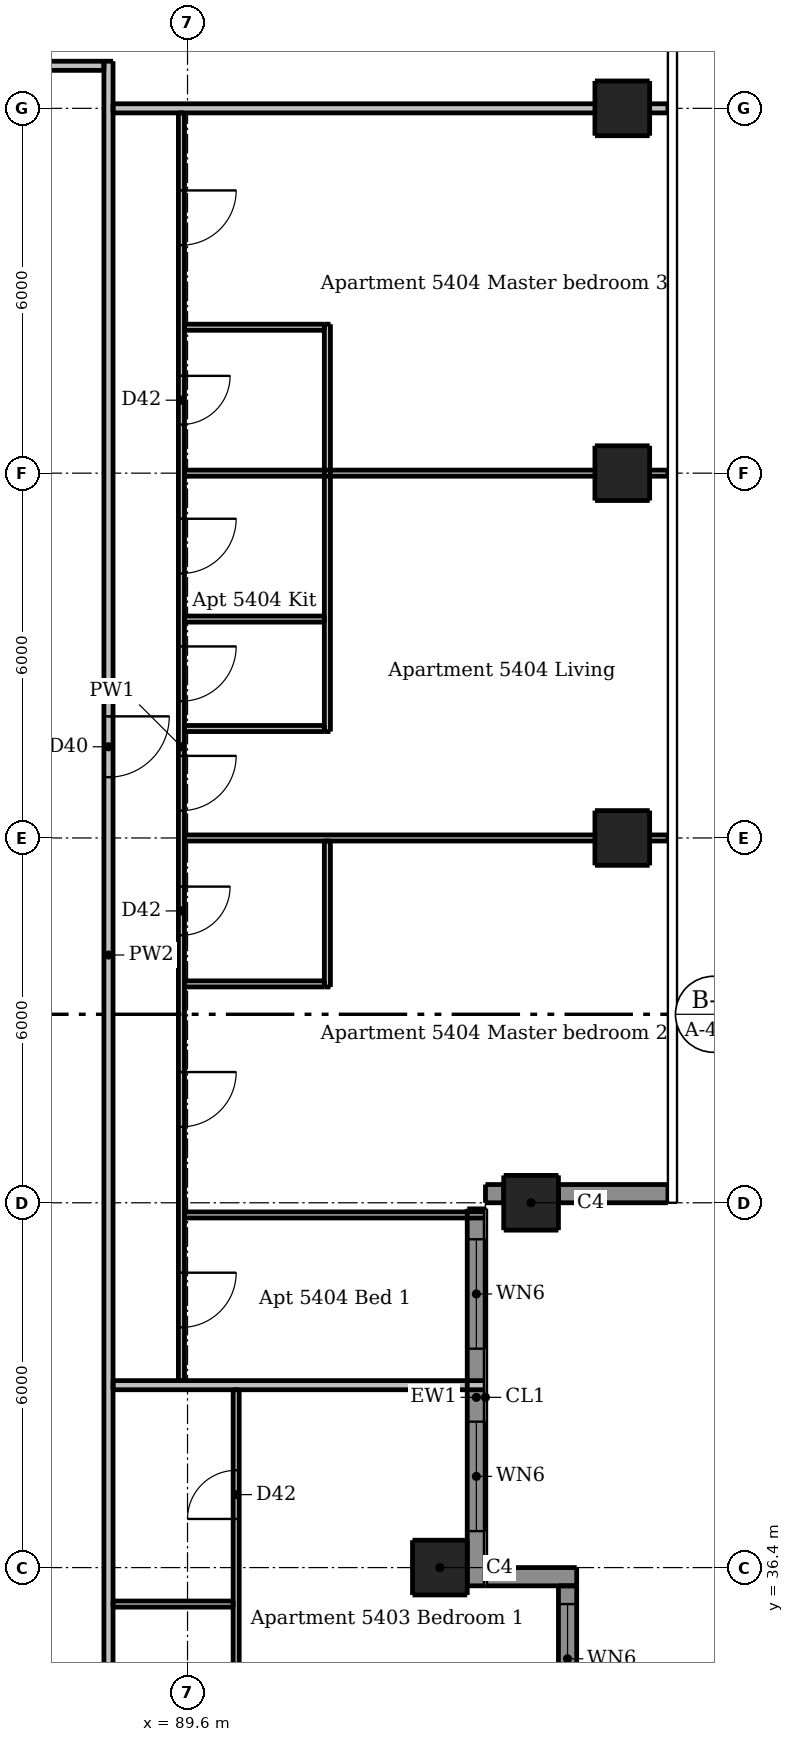
"""IFC4 building model, lengths in metres.
Left out: names, types, materials, properties, quantities, classifications, styles, units other than length and angle.
Written with IfcOpenShell. Run it as: python <this file> out.ifc"""

import sys

from ifc_helpers import new_model, si_unit, direction, frame, frame_2d, origin, origin_2d, place, context, subcontext, project, spatial, rectangle, extrude, element, fill, save


model = new_model("IFC4")
c1 = context("Model", 3, precision=1e-05, world=origin(), true_north=direction((0.0, 1.0)))
c2 = subcontext(c1, "Body", "Model", "MODEL_VIEW")
j1 = project(units=[si_unit("LENGTHUNIT", "METRE"), si_unit("PLANEANGLEUNIT", "RADIAN")], contexts=[c1])
p1 = place(None, origin())
s1 = spatial("IfcSite", under=j1, at=p1, CompositionType="ELEMENT")
p2 = place(p1, origin())
s2 = spatial("IfcBuilding", under=s1, at=p2, CompositionType="ELEMENT")
p3 = place(p2, frame((0.0, 0.0, 203.5)))
s3 = spatial("IfcBuildingStorey", under=s2, at=p3, CompositionType="ELEMENT", Elevation=203.5)
for number, where, z_axis, x_axis in (
    (1, (93.75, 36.4, 0.0), (0.0, 0.0, 1.0), (1.0, 0.0, 0.0)),
    (2, (95.25, 42.4, 0.0), (0.0, 0.0, 1.0), (1.0, 0.0, 0.0)),
    (3, (96.75, 48.4, 0.0), (0.0, 0.0, 1.0), (1.0, 0.0, 0.0)),
    (4, (96.75, 54.4, 0.0), (0.0, 0.0, 1.0), (1.0, 0.0, 0.0)),
    (5, (96.75, 60.4, 0.0), (0.0, 0.0, 1.0), (1.0, 0.0, 0.0)),
):
    element("IfcColumn", number, at=place(p3, frame(where, z_axis=z_axis, x_axis=x_axis)), inside=s3, PredefinedType="COLUMN", context=c2, shape_type="SweptSolid", body=[
        extrude(rectangle(XDim=0.9, YDim=0.9, at=origin_2d()), origin(), (0.0, 0.0, 1.0), 3.05),
    ])
p4 = place(p3, frame((96.0, 36.25, 0.0), z_axis=(0.0, 0.0, 1.0), x_axis=(-1.0, 0.0, 0.0)))
e6 = element("IfcWall", 6, at=p4, inside=s3, PredefinedType="SOLIDWALL", context=c2, shape_type="SweptSolid", body=[
    extrude(rectangle(XDim=1.5, YDim=0.3, at=frame_2d((0.75, 0.0))), origin(), (0.0, 0.0, 1.0), 3.05),
])
p5 = place(p3, frame((94.5, 42.55, 0.0), z_axis=(0.0, 0.0, 1.0), x_axis=(1.0, 0.0, 0.0)))
e7 = element("IfcWall", 7, at=p5, inside=s3, PredefinedType="SOLIDWALL", context=c2, shape_type="SweptSolid", body=[
    extrude(rectangle(XDim=0.3, YDim=0.3, at=frame_2d((0.15, 0.0))), origin(), (0.0, 0.0, 1.0), 3.05),
])
p6 = place(p3, frame((95.7, 42.55, 0.0), z_axis=(0.0, 0.0, 1.0), x_axis=(1.0, 0.0, 0.0)))
e8 = element("IfcWall", 8, at=p6, inside=s3, PredefinedType="SOLIDWALL", context=c2, shape_type="SweptSolid", body=[
    extrude(rectangle(XDim=1.8, YDim=0.3, at=frame_2d((0.9, 0.0))), origin(), (0.0, 0.0, 1.0), 3.05),
])
p7 = place(p3, frame((95.85, 30.1, 0.0), z_axis=(0.0, 0.0, 1.0), x_axis=(0.0, 1.0, 0.0)))
e9 = element("IfcWall", 9, at=p7, inside=s3, PredefinedType="SOLIDWALL", context=c2, shape_type="SweptSolid", body=[
    extrude(rectangle(XDim=6.0, YDim=0.3, at=frame_2d((3.0, 0.0))), origin(), (0.0, 0.0, 1.0), 3.05),
])
p8 = place(p7, frame((0.9, 0.0, 0.15)))
e10 = element("IfcOpeningElement", 10, at=p8, cuts=e9, PredefinedType="OPENING", context=c2, shape_type="SweptSolid", body=[
    extrude(rectangle(XDim=1.8, YDim=2.1, at=frame_2d((0.9, 1.05))), frame((0.0, 0.16, 0.0), z_axis=(0.0, -1.0, 0.0), x_axis=(1.0, 0.0, 0.0)), (0.0, 0.0, 1.0), 0.32),
])
p9 = place(p7, frame((3.9, 0.0, 0.15)))
e11 = element("IfcOpeningElement", 11, at=p9, cuts=e9, PredefinedType="OPENING", context=c2, shape_type="SweptSolid", body=[
    extrude(rectangle(XDim=1.8, YDim=2.1, at=frame_2d((0.9, 1.05))), frame((0.0, 0.16, 0.0), z_axis=(0.0, -1.0, 0.0), x_axis=(1.0, 0.0, 0.0)), (0.0, 0.0, 1.0), 0.32),
])
p10 = place(p3, frame((94.35, 36.1, 0.0), z_axis=(0.0, 0.0, 1.0), x_axis=(0.0, 1.0, 0.0)))
e12 = element("IfcWall", 12, at=p10, inside=s3, PredefinedType="SOLIDWALL", context=c2, shape_type="SweptSolid", body=[
    extrude(rectangle(XDim=6.2, YDim=0.3, at=frame_2d((3.1, 0.0))), origin(), (0.0, 0.0, 1.0), 3.05),
])
p11 = place(p10, frame((0.9, 0.0, 0.15)))
e13 = element("IfcOpeningElement", 13, at=p11, cuts=e12, PredefinedType="OPENING", context=c2, shape_type="SweptSolid", body=[
    extrude(rectangle(XDim=1.8, YDim=2.1, at=frame_2d((0.9, 1.05))), frame((0.0, 0.16, 0.0), z_axis=(0.0, -1.0, 0.0), x_axis=(1.0, 0.0, 0.0)), (0.0, 0.0, 1.0), 0.32),
])
p12 = place(p10, frame((3.9, 0.0, 0.15)))
e14 = element("IfcOpeningElement", 14, at=p12, cuts=e12, PredefinedType="OPENING", context=c2, shape_type="SweptSolid", body=[
    extrude(rectangle(XDim=1.8, YDim=2.1, at=frame_2d((0.9, 1.05))), frame((0.0, 0.16, 0.0), z_axis=(0.0, -1.0, 0.0), x_axis=(1.0, 0.0, 0.0)), (0.0, 0.0, 1.0), 0.32),
])
p13 = place(p3, frame((89.5, 60.325, 0.0), z_axis=(0.0, 0.0, 1.0), x_axis=(0.0, -1.0, 0.0)))
e15 = element("IfcWall", 15, at=p13, inside=s3, PredefinedType="PARTITIONING", context=c2, shape_type="SweptSolid", body=[
    extrude(rectangle(XDim=20.85, YDim=0.1, at=frame_2d((10.425, 0.0))), origin(), (0.0, 0.0, 1.0), 2.51),
])
p14 = place(p13, frame((10.575, 0.0, 0.0)))
e16 = element("IfcOpeningElement", 16, at=p14, cuts=e15, PredefinedType="OPENING", context=c2, shape_type="SweptSolid", body=[
    extrude(rectangle(XDim=0.9, YDim=2.1, at=frame_2d((0.45, 1.05))), frame((0.0, 0.06, 0.0), z_axis=(0.0, -1.0, 0.0), x_axis=(1.0, 0.0, 0.0)), (0.0, 0.0, 1.0), 0.12),
])
p15 = place(p13, frame((6.675, 0.0, 0.0)))
e17 = element("IfcOpeningElement", 17, at=p15, cuts=e15, PredefinedType="OPENING", context=c2, shape_type="SweptSolid", body=[
    extrude(rectangle(XDim=0.9, YDim=2.1, at=frame_2d((0.45, 1.05))), frame((0.0, 0.06, 0.0), z_axis=(0.0, -1.0, 0.0), x_axis=(1.0, 0.0, 0.0)), (0.0, 0.0, 1.0), 0.12),
])
p16 = place(p13, frame((8.775, 0.0, 0.0)))
e18 = element("IfcOpeningElement", 18, at=p16, cuts=e15, PredefinedType="OPENING", context=c2, shape_type="SweptSolid", body=[
    extrude(rectangle(XDim=0.9, YDim=2.1, at=frame_2d((0.45, 1.05))), frame((0.0, 0.06, 0.0), z_axis=(0.0, -1.0, 0.0), x_axis=(1.0, 0.0, 0.0)), (0.0, 0.0, 1.0), 0.12),
])
p17 = place(p13, frame((19.075, 0.0, 0.0)))
e19 = element("IfcOpeningElement", 19, at=p17, cuts=e15, PredefinedType="OPENING", context=c2, shape_type="SweptSolid", body=[
    extrude(rectangle(XDim=0.9, YDim=2.1, at=frame_2d((0.45, 1.05))), frame((0.0, 0.06, 0.0), z_axis=(0.0, -1.0, 0.0), x_axis=(1.0, 0.0, 0.0)), (0.0, 0.0, 1.0), 0.12),
])
p18 = place(p13, frame((15.775, 0.0, 0.0)))
e20 = element("IfcOpeningElement", 20, at=p18, cuts=e15, PredefinedType="OPENING", context=c2, shape_type="SweptSolid", body=[
    extrude(rectangle(XDim=0.9, YDim=2.1, at=frame_2d((0.45, 1.05))), frame((0.0, 0.06, 0.0), z_axis=(0.0, -1.0, 0.0), x_axis=(1.0, 0.0, 0.0)), (0.0, 0.0, 1.0), 0.12),
])
p19 = place(p13, frame((1.275, 0.0, 0.0)))
e21 = element("IfcOpeningElement", 21, at=p19, cuts=e15, PredefinedType="OPENING", context=c2, shape_type="SweptSolid", body=[
    extrude(rectangle(XDim=0.9, YDim=2.1, at=frame_2d((0.45, 1.05))), frame((0.0, 0.06, 0.0), z_axis=(0.0, -1.0, 0.0), x_axis=(1.0, 0.0, 0.0)), (0.0, 0.0, 1.0), 0.12),
])
p20 = place(p13, frame((12.725, 0.0, 0.0)))
e22 = element("IfcOpeningElement", 22, at=p20, cuts=e15, PredefinedType="OPENING", context=c2, shape_type="SweptSolid", body=[
    extrude(rectangle(XDim=0.8, YDim=2.1, at=frame_2d((0.4, 1.05))), frame((0.0, 0.06, 0.0), z_axis=(0.0, -1.0, 0.0), x_axis=(1.0, 0.0, 0.0)), (0.0, 0.0, 1.0), 0.12),
])
p21 = place(p13, frame((4.325, 0.0, 0.0)))
e23 = element("IfcOpeningElement", 23, at=p21, cuts=e15, PredefinedType="OPENING", context=c2, shape_type="SweptSolid", body=[
    extrude(rectangle(XDim=0.8, YDim=2.1, at=frame_2d((0.4, 1.05))), frame((0.0, 0.06, 0.0), z_axis=(0.0, -1.0, 0.0), x_axis=(1.0, 0.0, 0.0)), (0.0, 0.0, 1.0), 0.12),
])
p22 = place(p3, frame((90.4, 33.45, 0.0), z_axis=(0.0, 0.0, 1.0), x_axis=(0.0, 1.0, 0.0)))
e24 = element("IfcWall", 24, at=p22, inside=s3, PredefinedType="PARTITIONING", context=c2, shape_type="SweptSolid", body=[
    extrude(rectangle(XDim=5.875, YDim=0.1, at=frame_2d((2.938, 0.0))), origin(), (0.0, 0.0, 1.0), 3.05),
])
p23 = place(p22, frame((3.75, 0.0, 0.0)))
e25 = element("IfcOpeningElement", 25, at=p23, cuts=e24, PredefinedType="OPENING", context=c2, shape_type="SweptSolid", body=[
    extrude(rectangle(XDim=0.8, YDim=2.1, at=frame_2d((0.4, 1.05))), frame((0.0, 0.06, 0.0), z_axis=(0.0, -1.0, 0.0), x_axis=(1.0, 0.0, 0.0)), (0.0, 0.0, 1.0), 0.12),
])
p24 = place(p3, frame((91.9, 45.95, 0.0), z_axis=(0.0, 0.0, 1.0), x_axis=(0.0, 1.0, 0.0)))
e26 = element("IfcWall", 26, at=p24, inside=s3, PredefinedType="PARTITIONING", context=c2, shape_type="SweptSolid", body=[
    extrude(rectangle(XDim=2.4, YDim=0.1, at=frame_2d((1.2, 0.0))), origin(), (0.0, 0.0, 1.0), 3.05),
])
p25 = place(p3, frame((91.9, 50.15, 0.0), z_axis=(0.0, 0.0, 1.0), x_axis=(0.0, 1.0, 0.0)))
e27 = element("IfcWall", 27, at=p25, inside=s3, PredefinedType="PARTITIONING", context=c2, shape_type="SweptSolid", body=[
    extrude(rectangle(XDim=6.7, YDim=0.1, at=frame_2d((3.35, 0.0))), origin(), (0.0, 0.0, 1.0), 3.05),
])
p26 = place(p3, frame((89.55, 56.8, 0.0), z_axis=(0.0, 0.0, 1.0), x_axis=(1.0, 0.0, 0.0)))
e28 = element("IfcWall", 28, at=p26, inside=s3, PredefinedType="PARTITIONING", context=c2, shape_type="SweptSolid", body=[
    extrude(rectangle(XDim=2.3, YDim=0.1, at=frame_2d((1.15, 0.0))), origin(), (0.0, 0.0, 1.0), 3.05),
])
p27 = place(p3, frame((89.55, 54.4, 0.0), z_axis=(0.0, 0.0, 1.0), x_axis=(1.0, 0.0, 0.0)))
e29 = element("IfcWall", 29, at=p27, inside=s3, PredefinedType="PARTITIONING", context=c2, shape_type="SweptSolid", body=[
    extrude(rectangle(XDim=7.95, YDim=0.1, at=frame_2d((3.975, 0.0))), origin(), (0.0, 0.0, 1.0), 2.516),
])
for number, where, z_axis, x_axis in (
    (30, (89.55, 52.0, 0.0), (0.0, 0.0, 1.0), (1.0, 0.0, 0.0)),
    (31, (89.55, 50.2, 0.0), (0.0, 0.0, 1.0), (1.0, 0.0, 0.0)),
):
    element("IfcWall", number, at=place(p3, frame(where, z_axis=z_axis, x_axis=x_axis)), inside=s3, PredefinedType="PARTITIONING", context=c2, shape_type="SweptSolid", body=[
        extrude(rectangle(XDim=2.3, YDim=0.1, at=frame_2d((1.15, 0.0))), origin(), (0.0, 0.0, 1.0), 3.05),
    ])
p28 = place(p3, frame((89.55, 48.4, 0.0), z_axis=(0.0, 0.0, 1.0), x_axis=(1.0, 0.0, 0.0)))
e32 = element("IfcWall", 32, at=p28, inside=s3, PredefinedType="PARTITIONING", context=c2, shape_type="SweptSolid", body=[
    extrude(rectangle(XDim=7.95, YDim=0.1, at=frame_2d((3.975, 0.0))), origin(), (0.0, 0.0, 1.0), 2.516),
])
p29 = place(p3, frame((89.55, 46.0, 0.0), z_axis=(0.0, 0.0, 1.0), x_axis=(1.0, 0.0, 0.0)))
e33 = element("IfcWall", 33, at=p29, inside=s3, PredefinedType="PARTITIONING", context=c2, shape_type="SweptSolid", body=[
    extrude(rectangle(XDim=2.3, YDim=0.1, at=frame_2d((1.15, 0.0))), origin(), (0.0, 0.0, 1.0), 3.05),
])
p30 = place(p3, frame((89.55, 42.2, 0.0), z_axis=(0.0, 0.0, 1.0), x_axis=(1.0, 0.0, 0.0)))
e34 = element("IfcWall", 34, at=p30, inside=s3, PredefinedType="PARTITIONING", context=c2, shape_type="SweptSolid", body=[
    extrude(rectangle(XDim=4.95, YDim=0.1, at=frame_2d((2.475, 0.0))), origin(), (0.0, 0.0, 1.0), 3.05),
])
p31 = place(p3, frame((88.375, 35.8, 0.0), z_axis=(0.0, 0.0, 1.0), x_axis=(1.0, 0.0, 0.0)))
e35 = element("IfcWall", 35, at=p31, inside=s3, PredefinedType="PARTITIONING", context=c2, shape_type="SweptSolid", body=[
    extrude(rectangle(XDim=1.975, YDim=0.1, at=frame_2d((0.988, 0.0))), origin(), (0.0, 0.0, 1.0), 3.05),
])
p32 = place(p3, frame((88.3, 61.175, 0.0), z_axis=(0.0, 0.0, 1.0), x_axis=(0.0, -1.0, 0.0)))
e36 = element("IfcWall", 36, at=p32, inside=s3, PredefinedType="PARTITIONING", context=c2, shape_type="SweptSolid", body=[
    extrude(rectangle(XDim=29.4, YDim=0.15, at=frame_2d((14.7, 0.0))), origin(), (0.0, 0.0, 1.0), 3.05),
])
p33 = place(p32, frame((28.125, 0.0, 0.0)))
e37 = element("IfcOpeningElement", 37, at=p33, cuts=e36, PredefinedType="OPENING", context=c2, shape_type="SweptSolid", body=[
    extrude(rectangle(XDim=1.0, YDim=2.1, at=frame_2d((0.5, 1.05))), frame((0.0, 0.085, 0.0), z_axis=(0.0, -1.0, 0.0), x_axis=(1.0, 0.0, 0.0)), (0.0, 0.0, 1.0), 0.17),
])
p34 = place(p32, frame((10.775, 0.0, 0.0)))
e38 = element("IfcOpeningElement", 38, at=p34, cuts=e36, PredefinedType="OPENING", context=c2, shape_type="SweptSolid", body=[
    extrude(rectangle(XDim=1.0, YDim=2.1, at=frame_2d((0.5, 1.05))), frame((0.0, 0.085, 0.0), z_axis=(0.0, -1.0, 0.0), x_axis=(1.0, 0.0, 0.0)), (0.0, 0.0, 1.0), 0.17),
])
p35 = place(p3, frame((58.975, 61.1, 0.0), z_axis=(0.0, 0.0, 1.0), x_axis=(1.0, 0.0, 0.0)))
e39 = element("IfcWall", 39, at=p35, inside=s3, PredefinedType="PARTITIONING", context=c2, shape_type="SweptSolid", body=[
    extrude(rectangle(XDim=29.25, YDim=0.15, at=frame_2d((14.625, 0.0))), origin(), (0.0, 0.0, 1.0), 3.05),
])
p36 = place(p35, frame((7.925, 0.0, 0.0)))
e40 = element("IfcOpeningElement", 40, at=p36, cuts=e39, PredefinedType="OPENING", context=c2, shape_type="SweptSolid", body=[
    extrude(rectangle(XDim=1.0, YDim=2.1, at=frame_2d((0.5, 1.05))), frame((0.0, 0.085, 0.0), z_axis=(0.0, -1.0, 0.0), x_axis=(1.0, 0.0, 0.0)), (0.0, 0.0, 1.0), 0.17),
])
p37 = place(p35, frame((26.475, 0.0, 0.0)))
e41 = element("IfcOpeningElement", 41, at=p37, cuts=e39, PredefinedType="OPENING", context=c2, shape_type="SweptSolid", body=[
    extrude(rectangle(XDim=1.0, YDim=2.1, at=frame_2d((0.5, 1.05))), frame((0.0, 0.085, 0.0), z_axis=(0.0, -1.0, 0.0), x_axis=(1.0, 0.0, 0.0)), (0.0, 0.0, 1.0), 0.17),
])
p38 = place(p3, frame((88.375, 60.4, 0.0), z_axis=(0.0, 0.0, 1.0), x_axis=(1.0, 0.0, 0.0)))
e42 = element("IfcWall", 42, at=p38, inside=s3, PredefinedType="PARTITIONING", context=c2, shape_type="SweptSolid", body=[
    extrude(rectangle(XDim=9.125, YDim=0.15, at=frame_2d((4.562, 0.0))), origin(), (0.0, 0.0, 1.0), 2.59),
])
p39 = place(p3, frame((88.375, 39.4, 0.0), z_axis=(0.0, 0.0, 1.0), x_axis=(1.0, 0.0, 0.0)))
e43 = element("IfcWall", 43, at=p39, inside=s3, PredefinedType="PARTITIONING", context=c2, shape_type="SweptSolid", body=[
    extrude(rectangle(XDim=6.125, YDim=0.15, at=frame_2d((3.062, 0.0))), origin(), (0.0, 0.0, 1.0), 3.05),
])
p40 = place(p9, origin())
e44 = element("IfcWindow", 44, at=p40, inside=s3, PartitioningType="DOUBLE_PANEL_VERTICAL", PredefinedType="WINDOW", context=c2, shape_type="SweptSolid", body=[
    extrude(rectangle(XDim=1.8, YDim=2.1, at=frame_2d((0.9, 1.05))), frame((0.0, 0.03, 0.0), z_axis=(0.0, -1.0, 0.0), x_axis=(1.0, 0.0, 0.0)), (0.0, 0.0, 1.0), 0.06),
])
fill(e11, e44)
p41 = place(p11, origin())
e45 = element("IfcWindow", 45, at=p41, inside=s3, PartitioningType="DOUBLE_PANEL_VERTICAL", PredefinedType="WINDOW", context=c2, shape_type="SweptSolid", body=[
    extrude(rectangle(XDim=1.8, YDim=2.1, at=frame_2d((0.9, 1.05))), frame((0.0, 0.03, 0.0), z_axis=(0.0, -1.0, 0.0), x_axis=(1.0, 0.0, 0.0)), (0.0, 0.0, 1.0), 0.06),
])
fill(e13, e45)
p42 = place(p12, origin())
e46 = element("IfcWindow", 46, at=p42, inside=s3, PartitioningType="DOUBLE_PANEL_VERTICAL", PredefinedType="WINDOW", context=c2, shape_type="SweptSolid", body=[
    extrude(rectangle(XDim=1.8, YDim=2.1, at=frame_2d((0.9, 1.05))), frame((0.0, 0.03, 0.0), z_axis=(0.0, -1.0, 0.0), x_axis=(1.0, 0.0, 0.0)), (0.0, 0.0, 1.0), 0.06),
])
fill(e14, e46)
p43 = place(p23, origin())
e47 = element("IfcDoor", 47, at=p43, inside=s3, OperationType="SINGLE_SWING_LEFT", PredefinedType="DOOR", context=c2, shape_type="SweptSolid", body=[
    extrude(rectangle(XDim=0.8, YDim=2.1, at=frame_2d((0.4, 1.05))), frame((0.0, 0.025, 0.0), z_axis=(0.0, -1.0, 0.0), x_axis=(1.0, 0.0, 0.0)), (0.0, 0.0, 1.0), 0.05),
])
fill(e25, e47)
p44 = place(p34, origin())
e48 = element("IfcDoor", 48, at=p44, inside=s3, OperationType="SINGLE_SWING_LEFT", PredefinedType="DOOR", context=c2, shape_type="SweptSolid", body=[
    extrude(rectangle(XDim=1.0, YDim=2.1, at=frame_2d((0.5, 1.05))), frame((0.0, 0.025, 0.0), z_axis=(0.0, -1.0, 0.0), x_axis=(1.0, 0.0, 0.0)), (0.0, 0.0, 1.0), 0.05),
])
fill(e38, e48)
p45 = place(p14, origin())
e49 = element("IfcDoor", 49, at=p45, inside=s3, OperationType="SINGLE_SWING_LEFT", PredefinedType="DOOR", context=c2, shape_type="SweptSolid", body=[
    extrude(rectangle(XDim=0.9, YDim=2.1, at=frame_2d((0.45, 1.05))), frame((0.0, 0.025, 0.0), z_axis=(0.0, -1.0, 0.0), x_axis=(1.0, 0.0, 0.0)), (0.0, 0.0, 1.0), 0.05),
])
fill(e16, e49)
p46 = place(p15, origin())
e50 = element("IfcDoor", 50, at=p46, inside=s3, OperationType="SINGLE_SWING_LEFT", PredefinedType="DOOR", context=c2, shape_type="SweptSolid", body=[
    extrude(rectangle(XDim=0.9, YDim=2.1, at=frame_2d((0.45, 1.05))), frame((0.0, 0.025, 0.0), z_axis=(0.0, -1.0, 0.0), x_axis=(1.0, 0.0, 0.0)), (0.0, 0.0, 1.0), 0.05),
])
fill(e17, e50)
p47 = place(p16, origin())
e51 = element("IfcDoor", 51, at=p47, inside=s3, OperationType="SINGLE_SWING_LEFT", PredefinedType="DOOR", context=c2, shape_type="SweptSolid", body=[
    extrude(rectangle(XDim=0.9, YDim=2.1, at=frame_2d((0.45, 1.05))), frame((0.0, 0.025, 0.0), z_axis=(0.0, -1.0, 0.0), x_axis=(1.0, 0.0, 0.0)), (0.0, 0.0, 1.0), 0.05),
])
fill(e18, e51)
p48 = place(p17, origin())
e52 = element("IfcDoor", 52, at=p48, inside=s3, OperationType="SINGLE_SWING_LEFT", PredefinedType="DOOR", context=c2, shape_type="SweptSolid", body=[
    extrude(rectangle(XDim=0.9, YDim=2.1, at=frame_2d((0.45, 1.05))), frame((0.0, 0.025, 0.0), z_axis=(0.0, -1.0, 0.0), x_axis=(1.0, 0.0, 0.0)), (0.0, 0.0, 1.0), 0.05),
])
fill(e19, e52)
p49 = place(p18, origin())
e53 = element("IfcDoor", 53, at=p49, inside=s3, OperationType="SINGLE_SWING_LEFT", PredefinedType="DOOR", context=c2, shape_type="SweptSolid", body=[
    extrude(rectangle(XDim=0.9, YDim=2.1, at=frame_2d((0.45, 1.05))), frame((0.0, 0.025, 0.0), z_axis=(0.0, -1.0, 0.0), x_axis=(1.0, 0.0, 0.0)), (0.0, 0.0, 1.0), 0.05),
])
fill(e20, e53)
p50 = place(p19, origin())
e54 = element("IfcDoor", 54, at=p50, inside=s3, OperationType="SINGLE_SWING_LEFT", PredefinedType="DOOR", context=c2, shape_type="SweptSolid", body=[
    extrude(rectangle(XDim=0.9, YDim=2.1, at=frame_2d((0.45, 1.05))), frame((0.0, 0.025, 0.0), z_axis=(0.0, -1.0, 0.0), x_axis=(1.0, 0.0, 0.0)), (0.0, 0.0, 1.0), 0.05),
])
fill(e21, e54)
p51 = place(p20, origin())
e55 = element("IfcDoor", 55, at=p51, inside=s3, OperationType="SINGLE_SWING_LEFT", PredefinedType="DOOR", context=c2, shape_type="SweptSolid", body=[
    extrude(rectangle(XDim=0.8, YDim=2.1, at=frame_2d((0.4, 1.05))), frame((0.0, 0.025, 0.0), z_axis=(0.0, -1.0, 0.0), x_axis=(1.0, 0.0, 0.0)), (0.0, 0.0, 1.0), 0.05),
])
fill(e22, e55)
p52 = place(p21, origin())
e56 = element("IfcDoor", 56, at=p52, inside=s3, OperationType="SINGLE_SWING_LEFT", PredefinedType="DOOR", context=c2, shape_type="SweptSolid", body=[
    extrude(rectangle(XDim=0.8, YDim=2.1, at=frame_2d((0.4, 1.05))), frame((0.0, 0.025, 0.0), z_axis=(0.0, -1.0, 0.0), x_axis=(1.0, 0.0, 0.0)), (0.0, 0.0, 1.0), 0.05),
])
fill(e23, e56)
save(model, sys.argv[1])
